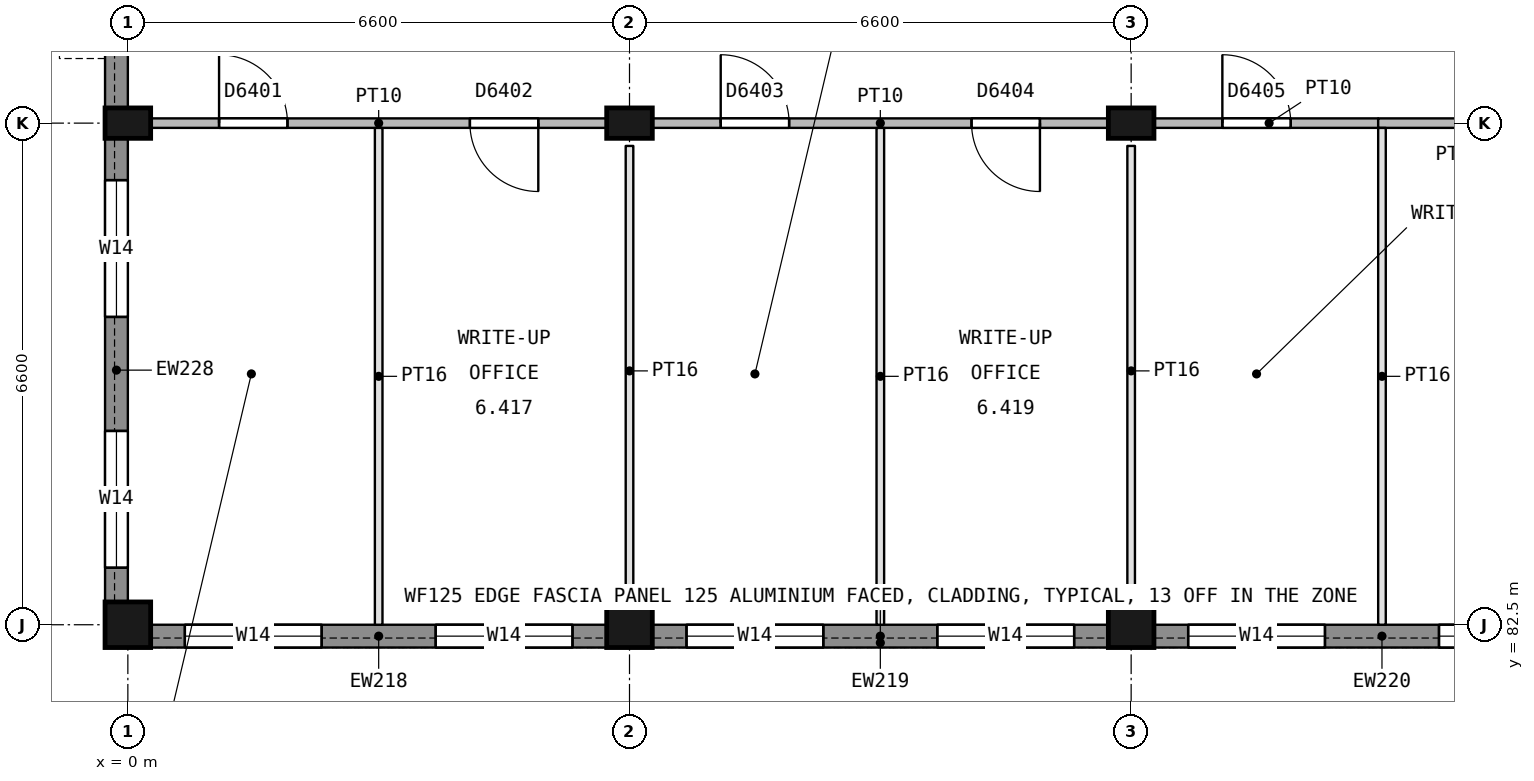
"""IFC4 building model, lengths in metres.
Left out: names, types, materials, properties, quantities, classifications, styles, units other than length and angle.
Written with IfcOpenShell. Run it as: python <this file> out.ifc"""

import sys

from ifc_helpers import new_model, si_unit, direction, frame, frame_2d, origin, origin_2d, place, context, subcontext, project, spatial, rectangle, extrude, element, fill, save


model = new_model("IFC4")
c1 = context("Model", 3, precision=1e-05, world=origin(), true_north=direction((0.0, 1.0)))
c2 = subcontext(c1, "Body", "Model", "MODEL_VIEW")
j1 = project(units=[si_unit("LENGTHUNIT", "METRE"), si_unit("PLANEANGLEUNIT", "RADIAN")], contexts=[c1])
p1 = place(None, origin())
s1 = spatial("IfcSite", under=j1, at=p1, CompositionType="ELEMENT")
p2 = place(p1, origin())
s2 = spatial("IfcBuilding", under=s1, at=p2, CompositionType="ELEMENT")
p3 = place(p2, frame((0.0, 0.0, 18.9)))
s3 = spatial("IfcBuildingStorey", under=s2, at=p3, CompositionType="ELEMENT", Elevation=18.9)
p4 = place(p3, frame((0.0, 82.5, 0.0), z_axis=(0.0, 0.0, 1.0), x_axis=(1.0, 0.0, 0.0)))
e1 = element("IfcColumn", 1, at=p4, inside=s3, PredefinedType="COLUMN", context=c2, shape_type="SweptSolid", body=[
    extrude(rectangle(XDim=0.6, YDim=0.6, at=origin_2d()), origin(), (0.0, 0.0, 1.0), 4.25),
])
p5 = place(p3, frame((0.0, 89.1, 0.0), z_axis=(0.0, 0.0, 1.0), x_axis=(1.0, 0.0, 0.0)))
e2 = element("IfcColumn", 2, at=p5, inside=s3, PredefinedType="COLUMN", context=c2, shape_type="SweptSolid", body=[
    extrude(rectangle(XDim=0.6, YDim=0.4, at=origin_2d()), origin(), (0.0, 0.0, 1.0), 4.25),
])
p6 = place(p3, frame((6.6, 82.5, 0.0), z_axis=(0.0, 0.0, 1.0), x_axis=(1.0, 0.0, 0.0)))
e3 = element("IfcColumn", 3, at=p6, inside=s3, PredefinedType="COLUMN", context=c2, shape_type="SweptSolid", body=[
    extrude(rectangle(XDim=0.6, YDim=0.6, at=origin_2d()), origin(), (0.0, 0.0, 1.0), 4.25),
])
p7 = place(p3, frame((6.6, 89.1, 0.0), z_axis=(0.0, 0.0, 1.0), x_axis=(1.0, 0.0, 0.0)))
e4 = element("IfcColumn", 4, at=p7, inside=s3, PredefinedType="COLUMN", context=c2, shape_type="SweptSolid", body=[
    extrude(rectangle(XDim=0.6, YDim=0.4, at=origin_2d()), origin(), (0.0, 0.0, 1.0), 4.25),
])
p8 = place(p3, frame((13.2, 82.5, 0.0), z_axis=(0.0, 0.0, 1.0), x_axis=(1.0, 0.0, 0.0)))
e5 = element("IfcColumn", 5, at=p8, inside=s3, PredefinedType="COLUMN", context=c2, shape_type="SweptSolid", body=[
    extrude(rectangle(XDim=0.6, YDim=0.6, at=origin_2d()), origin(), (0.0, 0.0, 1.0), 4.25),
])
p9 = place(p3, frame((13.2, 89.1, 0.0), z_axis=(0.0, 0.0, 1.0), x_axis=(1.0, 0.0, 0.0)))
e6 = element("IfcColumn", 6, at=p9, inside=s3, PredefinedType="COLUMN", context=c2, shape_type="SweptSolid", body=[
    extrude(rectangle(XDim=0.6, YDim=0.4, at=origin_2d()), origin(), (0.0, 0.0, 1.0), 4.25),
])
p10 = place(p3, frame((6.3, 82.35, 0.0), z_axis=(0.0, 0.0, 1.0), x_axis=(-1.0, 0.0, 0.0)))
e7 = element("IfcWall", 7, at=p10, inside=s3, PredefinedType="STANDARD", context=c2, shape_type="SweptSolid", body=[
    extrude(rectangle(XDim=6.0, YDim=0.3, at=frame_2d((3.0, 0.0))), origin(), (0.0, 0.0, 1.0), 3.65),
])
p11 = place(p10, frame((3.75, 0.0, 0.9)))
e8 = element("IfcOpeningElement", 8, at=p11, cuts=e7, PredefinedType="OPENING", context=c2, shape_type="SweptSolid", body=[
    extrude(rectangle(XDim=1.8, YDim=1.5, at=frame_2d((0.9, 0.75))), frame((0.0, 0.16, 0.0), z_axis=(0.0, -1.0, 0.0), x_axis=(1.0, 0.0, 0.0)), (0.0, 0.0, 1.0), 0.32),
])
p12 = place(p10, frame((0.45, 0.0, 0.9)))
e9 = element("IfcOpeningElement", 9, at=p12, cuts=e7, PredefinedType="OPENING", context=c2, shape_type="SweptSolid", body=[
    extrude(rectangle(XDim=1.8, YDim=1.5, at=frame_2d((0.9, 0.75))), frame((0.0, 0.16, 0.0), z_axis=(0.0, -1.0, 0.0), x_axis=(1.0, 0.0, 0.0)), (0.0, 0.0, 1.0), 0.32),
])
p13 = place(p3, frame((12.9, 82.35, 0.0), z_axis=(0.0, 0.0, 1.0), x_axis=(-1.0, 0.0, 0.0)))
e10 = element("IfcWall", 10, at=p13, inside=s3, PredefinedType="STANDARD", context=c2, shape_type="SweptSolid", body=[
    extrude(rectangle(XDim=6.0, YDim=0.3, at=frame_2d((3.0, 0.0))), origin(), (0.0, 0.0, 1.0), 3.65),
])
p14 = place(p13, frame((3.75, 0.0, 0.9)))
e11 = element("IfcOpeningElement", 11, at=p14, cuts=e10, PredefinedType="OPENING", context=c2, shape_type="SweptSolid", body=[
    extrude(rectangle(XDim=1.8, YDim=1.5, at=frame_2d((0.9, 0.75))), frame((0.0, 0.16, 0.0), z_axis=(0.0, -1.0, 0.0), x_axis=(1.0, 0.0, 0.0)), (0.0, 0.0, 1.0), 0.32),
])
p15 = place(p13, frame((0.45, 0.0, 0.9)))
e12 = element("IfcOpeningElement", 12, at=p15, cuts=e10, PredefinedType="OPENING", context=c2, shape_type="SweptSolid", body=[
    extrude(rectangle(XDim=1.8, YDim=1.5, at=frame_2d((0.9, 0.75))), frame((0.0, 0.16, 0.0), z_axis=(0.0, -1.0, 0.0), x_axis=(1.0, 0.0, 0.0)), (0.0, 0.0, 1.0), 0.32),
])
p16 = place(p3, frame((19.5, 82.35, 0.0), z_axis=(0.0, 0.0, 1.0), x_axis=(-1.0, 0.0, 0.0)))
e13 = element("IfcWall", 13, at=p16, inside=s3, PredefinedType="STANDARD", context=c2, shape_type="SweptSolid", body=[
    extrude(rectangle(XDim=6.0, YDim=0.3, at=frame_2d((3.0, 0.0))), origin(), (0.0, 0.0, 1.0), 3.65),
])
p17 = place(p16, frame((3.75, 0.0, 0.9)))
e14 = element("IfcOpeningElement", 14, at=p17, cuts=e13, PredefinedType="OPENING", context=c2, shape_type="SweptSolid", body=[
    extrude(rectangle(XDim=1.8, YDim=1.5, at=frame_2d((0.9, 0.75))), frame((0.0, 0.16, 0.0), z_axis=(0.0, -1.0, 0.0), x_axis=(1.0, 0.0, 0.0)), (0.0, 0.0, 1.0), 0.32),
])
p18 = place(p16, frame((0.45, 0.0, 0.9)))
e15 = element("IfcOpeningElement", 15, at=p18, cuts=e13, PredefinedType="OPENING", context=c2, shape_type="SweptSolid", body=[
    extrude(rectangle(XDim=1.8, YDim=1.5, at=frame_2d((0.9, 0.75))), frame((0.0, 0.16, 0.0), z_axis=(0.0, -1.0, 0.0), x_axis=(1.0, 0.0, 0.0)), (0.0, 0.0, 1.0), 0.32),
])
p19 = place(p3, frame((-0.15, 82.8, 0.0), z_axis=(0.0, 0.0, 1.0), x_axis=(0.0, 1.0, 0.0)))
e16 = element("IfcWall", 16, at=p19, inside=s3, PredefinedType="STANDARD", context=c2, shape_type="SweptSolid", body=[
    extrude(rectangle(XDim=6.1, YDim=0.3, at=frame_2d((3.05, 0.0))), origin(), (0.0, 0.0, 1.0), 3.65),
])
p20 = place(p19, frame((0.45, 0.0, 0.9)))
e17 = element("IfcOpeningElement", 17, at=p20, cuts=e16, PredefinedType="OPENING", context=c2, shape_type="SweptSolid", body=[
    extrude(rectangle(XDim=1.8, YDim=1.5, at=frame_2d((0.9, 0.75))), frame((0.0, 0.16, 0.0), z_axis=(0.0, -1.0, 0.0), x_axis=(1.0, 0.0, 0.0)), (0.0, 0.0, 1.0), 0.32),
])
p21 = place(p19, frame((3.75, 0.0, 0.9)))
e18 = element("IfcOpeningElement", 18, at=p21, cuts=e16, PredefinedType="OPENING", context=c2, shape_type="SweptSolid", body=[
    extrude(rectangle(XDim=1.8, YDim=1.5, at=frame_2d((0.9, 0.75))), frame((0.0, 0.16, 0.0), z_axis=(0.0, -1.0, 0.0), x_axis=(1.0, 0.0, 0.0)), (0.0, 0.0, 1.0), 0.32),
])
p22 = place(p3, frame((-0.15, 89.3, 0.0), z_axis=(0.0, 0.0, 1.0), x_axis=(0.0, 1.0, 0.0)))
e19 = element("IfcWall", 19, at=p22, inside=s3, PredefinedType="STANDARD", context=c2, shape_type="SweptSolid", body=[
    extrude(rectangle(XDim=3.1, YDim=0.3, at=frame_2d((1.55, 0.0))), origin(), (0.0, 0.0, 1.0), 3.65),
])
p23 = place(p22, frame((0.85, 0.0, 1.1)))
e20 = element("IfcOpeningElement", 20, at=p23, cuts=e19, PredefinedType="OPENING", context=c2, shape_type="SweptSolid", body=[
    extrude(rectangle(XDim=1.2, YDim=1.2, at=frame_2d((0.6, 0.6))), frame((0.0, 0.16, 0.0), z_axis=(0.0, -1.0, 0.0), x_axis=(1.0, 0.0, 0.0)), (0.0, 0.0, 1.0), 0.32),
])
p24 = place(p3, frame((6.3, 89.1, 0.0), z_axis=(0.0, 0.0, 1.0), x_axis=(-1.0, 0.0, 0.0)))
e21 = element("IfcWall", 21, at=p24, inside=s3, PredefinedType="PARTITIONING", context=c2, shape_type="SweptSolid", body=[
    extrude(rectangle(XDim=6.0, YDim=0.125, at=frame_2d((3.0, 0.0))), origin(), (0.0, 0.0, 1.0), 3.65),
])
p25 = place(p24, frame((4.2, 0.0, 0.0)))
e22 = element("IfcOpeningElement", 22, at=p25, cuts=e21, PredefinedType="OPENING", context=c2, shape_type="SweptSolid", body=[
    extrude(rectangle(XDim=0.9, YDim=2.1, at=frame_2d((0.45, 1.05))), frame((0.0, 0.073, 0.0), z_axis=(0.0, -1.0, 0.0), x_axis=(1.0, 0.0, 0.0)), (0.0, 0.0, 1.0), 0.145),
])
p26 = place(p24, frame((0.9, 0.0, 0.0)))
e23 = element("IfcOpeningElement", 23, at=p26, cuts=e21, PredefinedType="OPENING", context=c2, shape_type="SweptSolid", body=[
    extrude(rectangle(XDim=0.9, YDim=2.1, at=frame_2d((0.45, 1.05))), frame((0.0, 0.073, 0.0), z_axis=(0.0, -1.0, 0.0), x_axis=(1.0, 0.0, 0.0)), (0.0, 0.0, 1.0), 0.145),
])
p27 = place(p3, frame((12.9, 89.1, 0.0), z_axis=(0.0, 0.0, 1.0), x_axis=(-1.0, 0.0, 0.0)))
e24 = element("IfcWall", 24, at=p27, inside=s3, PredefinedType="PARTITIONING", context=c2, shape_type="SweptSolid", body=[
    extrude(rectangle(XDim=6.0, YDim=0.125, at=frame_2d((3.0, 0.0))), origin(), (0.0, 0.0, 1.0), 3.65),
])
p28 = place(p27, frame((4.2, 0.0, 0.0)))
e25 = element("IfcOpeningElement", 25, at=p28, cuts=e24, PredefinedType="OPENING", context=c2, shape_type="SweptSolid", body=[
    extrude(rectangle(XDim=0.9, YDim=2.1, at=frame_2d((0.45, 1.05))), frame((0.0, 0.073, 0.0), z_axis=(0.0, -1.0, 0.0), x_axis=(1.0, 0.0, 0.0)), (0.0, 0.0, 1.0), 0.145),
])
p29 = place(p27, frame((0.9, 0.0, 0.0)))
e26 = element("IfcOpeningElement", 26, at=p29, cuts=e24, PredefinedType="OPENING", context=c2, shape_type="SweptSolid", body=[
    extrude(rectangle(XDim=0.9, YDim=2.1, at=frame_2d((0.45, 1.05))), frame((0.0, 0.073, 0.0), z_axis=(0.0, -1.0, 0.0), x_axis=(1.0, 0.0, 0.0)), (0.0, 0.0, 1.0), 0.145),
])
p30 = place(p3, frame((16.45, 89.1, 0.0), z_axis=(0.0, 0.0, 1.0), x_axis=(-1.0, 0.0, 0.0)))
e27 = element("IfcWall", 27, at=p30, inside=s3, PredefinedType="PARTITIONING", context=c2, shape_type="SweptSolid", body=[
    extrude(rectangle(XDim=2.95, YDim=0.125, at=frame_2d((1.475, 0.0))), origin(), (0.0, 0.0, 1.0), 3.65),
])
p31 = place(p30, frame((1.15, 0.0, 0.0)))
e28 = element("IfcOpeningElement", 28, at=p31, cuts=e27, PredefinedType="OPENING", context=c2, shape_type="SweptSolid", body=[
    extrude(rectangle(XDim=0.9, YDim=2.1, at=frame_2d((0.45, 1.05))), frame((0.0, 0.073, 0.0), z_axis=(0.0, -1.0, 0.0), x_axis=(1.0, 0.0, 0.0)), (0.0, 0.0, 1.0), 0.145),
])
p32 = place(p3, frame((16.45, 89.1, 0.0), z_axis=(0.0, 0.0, 1.0), x_axis=(1.0, 0.0, 0.0)))
e29 = element("IfcWall", 29, at=p32, inside=s3, PredefinedType="PARTITIONING", context=c2, shape_type="SweptSolid", body=[
    extrude(rectangle(XDim=3.05, YDim=0.125, at=frame_2d((1.525, 0.0))), origin(), (0.0, 0.0, 1.0), 3.65),
])
p33 = place(p32, frame((1.15, 0.0, 0.0)))
e30 = element("IfcOpeningElement", 30, at=p33, cuts=e29, PredefinedType="OPENING", context=c2, shape_type="SweptSolid", body=[
    extrude(rectangle(XDim=1.8, YDim=2.1, at=frame_2d((0.9, 1.05))), frame((0.0, 0.073, 0.0), z_axis=(0.0, -1.0, 0.0), x_axis=(1.0, 0.0, 0.0)), (0.0, 0.0, 1.0), 0.145),
])
p34 = place(p3, frame((3.3, 82.5, 0.0), z_axis=(0.0, 0.0, 1.0), x_axis=(0.0, 1.0, 0.0)))
e31 = element("IfcWall", 31, at=p34, inside=s3, PredefinedType="PARTITIONING", context=c2, shape_type="SweptSolid", body=[
    extrude(rectangle(XDim=6.537, YDim=0.1, at=frame_2d((3.269, 0.0))), origin(), (0.0, 0.0, 1.0), 3.65),
])
p35 = place(p3, frame((6.6, 82.8, 0.0), z_axis=(0.0, 0.0, 1.0), x_axis=(0.0, 1.0, 0.0)))
e32 = element("IfcWall", 32, at=p35, inside=s3, PredefinedType="PARTITIONING", context=c2, shape_type="SweptSolid", body=[
    extrude(rectangle(XDim=6.0, YDim=0.1, at=frame_2d((3.0, 0.0))), origin(), (0.0, 0.0, 1.0), 3.65),
])
p36 = place(p3, frame((9.9, 82.5, 0.0), z_axis=(0.0, 0.0, 1.0), x_axis=(0.0, 1.0, 0.0)))
e33 = element("IfcWall", 33, at=p36, inside=s3, PredefinedType="PARTITIONING", context=c2, shape_type="SweptSolid", body=[
    extrude(rectangle(XDim=6.537, YDim=0.1, at=frame_2d((3.269, 0.0))), origin(), (0.0, 0.0, 1.0), 3.65),
])
p37 = place(p3, frame((13.2, 82.8, 0.0), z_axis=(0.0, 0.0, 1.0), x_axis=(0.0, 1.0, 0.0)))
e34 = element("IfcWall", 34, at=p37, inside=s3, PredefinedType="PARTITIONING", context=c2, shape_type="SweptSolid", body=[
    extrude(rectangle(XDim=6.0, YDim=0.1, at=frame_2d((3.0, 0.0))), origin(), (0.0, 0.0, 1.0), 3.65),
])
p38 = place(p3, frame((16.5, 82.5, 0.0), z_axis=(0.0, 0.0, 1.0), x_axis=(0.0, 1.0, 0.0)))
e35 = element("IfcWall", 35, at=p38, inside=s3, PredefinedType="PARTITIONING", context=c2, shape_type="SweptSolid", body=[
    extrude(rectangle(XDim=6.537, YDim=0.1, at=frame_2d((3.269, 0.0))), origin(), (0.0, 0.0, 1.0), 3.65),
])
p39 = place(p11, origin())
e36 = element("IfcWindow", 36, at=p39, inside=s3, PartitioningType="SINGLE_PANEL", PredefinedType="WINDOW", context=c2, shape_type="SweptSolid", body=[
    extrude(rectangle(XDim=1.8, YDim=1.5, at=frame_2d((0.9, 0.75))), frame((0.0, 0.03, 0.0), z_axis=(0.0, -1.0, 0.0), x_axis=(1.0, 0.0, 0.0)), (0.0, 0.0, 1.0), 0.06),
])
fill(e8, e36)
p40 = place(p12, origin())
e37 = element("IfcWindow", 37, at=p40, inside=s3, PartitioningType="SINGLE_PANEL", PredefinedType="WINDOW", context=c2, shape_type="SweptSolid", body=[
    extrude(rectangle(XDim=1.8, YDim=1.5, at=frame_2d((0.9, 0.75))), frame((0.0, 0.03, 0.0), z_axis=(0.0, -1.0, 0.0), x_axis=(1.0, 0.0, 0.0)), (0.0, 0.0, 1.0), 0.06),
])
fill(e9, e37)
p41 = place(p14, origin())
e38 = element("IfcWindow", 38, at=p41, inside=s3, PartitioningType="SINGLE_PANEL", PredefinedType="WINDOW", context=c2, shape_type="SweptSolid", body=[
    extrude(rectangle(XDim=1.8, YDim=1.5, at=frame_2d((0.9, 0.75))), frame((0.0, 0.03, 0.0), z_axis=(0.0, -1.0, 0.0), x_axis=(1.0, 0.0, 0.0)), (0.0, 0.0, 1.0), 0.06),
])
fill(e11, e38)
p42 = place(p15, origin())
e39 = element("IfcWindow", 39, at=p42, inside=s3, PartitioningType="SINGLE_PANEL", PredefinedType="WINDOW", context=c2, shape_type="SweptSolid", body=[
    extrude(rectangle(XDim=1.8, YDim=1.5, at=frame_2d((0.9, 0.75))), frame((0.0, 0.03, 0.0), z_axis=(0.0, -1.0, 0.0), x_axis=(1.0, 0.0, 0.0)), (0.0, 0.0, 1.0), 0.06),
])
fill(e12, e39)
p43 = place(p17, origin())
e40 = element("IfcWindow", 40, at=p43, inside=s3, PartitioningType="SINGLE_PANEL", PredefinedType="WINDOW", context=c2, shape_type="SweptSolid", body=[
    extrude(rectangle(XDim=1.8, YDim=1.5, at=frame_2d((0.9, 0.75))), frame((0.0, 0.03, 0.0), z_axis=(0.0, -1.0, 0.0), x_axis=(1.0, 0.0, 0.0)), (0.0, 0.0, 1.0), 0.06),
])
fill(e14, e40)
p44 = place(p18, origin())
e41 = element("IfcWindow", 41, at=p44, inside=s3, PartitioningType="SINGLE_PANEL", PredefinedType="WINDOW", context=c2, shape_type="SweptSolid", body=[
    extrude(rectangle(XDim=1.8, YDim=1.5, at=frame_2d((0.9, 0.75))), frame((0.0, 0.03, 0.0), z_axis=(0.0, -1.0, 0.0), x_axis=(1.0, 0.0, 0.0)), (0.0, 0.0, 1.0), 0.06),
])
fill(e15, e41)
p45 = place(p20, origin())
e42 = element("IfcWindow", 42, at=p45, inside=s3, PartitioningType="SINGLE_PANEL", PredefinedType="WINDOW", context=c2, shape_type="SweptSolid", body=[
    extrude(rectangle(XDim=1.8, YDim=1.5, at=frame_2d((0.9, 0.75))), frame((0.0, 0.03, 0.0), z_axis=(0.0, -1.0, 0.0), x_axis=(1.0, 0.0, 0.0)), (0.0, 0.0, 1.0), 0.06),
])
fill(e17, e42)
p46 = place(p21, origin())
e43 = element("IfcWindow", 43, at=p46, inside=s3, PartitioningType="SINGLE_PANEL", PredefinedType="WINDOW", context=c2, shape_type="SweptSolid", body=[
    extrude(rectangle(XDim=1.8, YDim=1.5, at=frame_2d((0.9, 0.75))), frame((0.0, 0.03, 0.0), z_axis=(0.0, -1.0, 0.0), x_axis=(1.0, 0.0, 0.0)), (0.0, 0.0, 1.0), 0.06),
])
fill(e18, e43)
p47 = place(p25, origin())
e44 = element("IfcDoor", 44, at=p47, inside=s3, OperationType="SINGLE_SWING_RIGHT", PredefinedType="DOOR", context=c2, shape_type="SweptSolid", body=[
    extrude(rectangle(XDim=0.9, YDim=2.1, at=frame_2d((0.45, 1.05))), frame((0.0, 0.025, 0.0), z_axis=(0.0, -1.0, 0.0), x_axis=(1.0, 0.0, 0.0)), (0.0, 0.0, 1.0), 0.05),
])
fill(e22, e44)
p48 = place(p26, origin())
e45 = element("IfcDoor", 45, at=p48, inside=s3, OperationType="SINGLE_SWING_LEFT", PredefinedType="DOOR", context=c2, shape_type="SweptSolid", body=[
    extrude(rectangle(XDim=0.9, YDim=2.1, at=frame_2d((0.45, 1.05))), frame((0.0, 0.025, 0.0), z_axis=(0.0, -1.0, 0.0), x_axis=(1.0, 0.0, 0.0)), (0.0, 0.0, 1.0), 0.05),
])
fill(e23, e45)
p49 = place(p28, origin())
e46 = element("IfcDoor", 46, at=p49, inside=s3, OperationType="SINGLE_SWING_RIGHT", PredefinedType="DOOR", context=c2, shape_type="SweptSolid", body=[
    extrude(rectangle(XDim=0.9, YDim=2.1, at=frame_2d((0.45, 1.05))), frame((0.0, 0.025, 0.0), z_axis=(0.0, -1.0, 0.0), x_axis=(1.0, 0.0, 0.0)), (0.0, 0.0, 1.0), 0.05),
])
fill(e25, e46)
p50 = place(p29, origin())
e47 = element("IfcDoor", 47, at=p50, inside=s3, OperationType="SINGLE_SWING_LEFT", PredefinedType="DOOR", context=c2, shape_type="SweptSolid", body=[
    extrude(rectangle(XDim=0.9, YDim=2.1, at=frame_2d((0.45, 1.05))), frame((0.0, 0.025, 0.0), z_axis=(0.0, -1.0, 0.0), x_axis=(1.0, 0.0, 0.0)), (0.0, 0.0, 1.0), 0.05),
])
fill(e26, e47)
p51 = place(p31, origin())
e48 = element("IfcDoor", 48, at=p51, inside=s3, OperationType="SINGLE_SWING_RIGHT", PredefinedType="DOOR", context=c2, shape_type="SweptSolid", body=[
    extrude(rectangle(XDim=0.9, YDim=2.1, at=frame_2d((0.45, 1.05))), frame((0.0, 0.025, 0.0), z_axis=(0.0, -1.0, 0.0), x_axis=(1.0, 0.0, 0.0)), (0.0, 0.0, 1.0), 0.05),
])
fill(e28, e48)
save(model, sys.argv[1])
